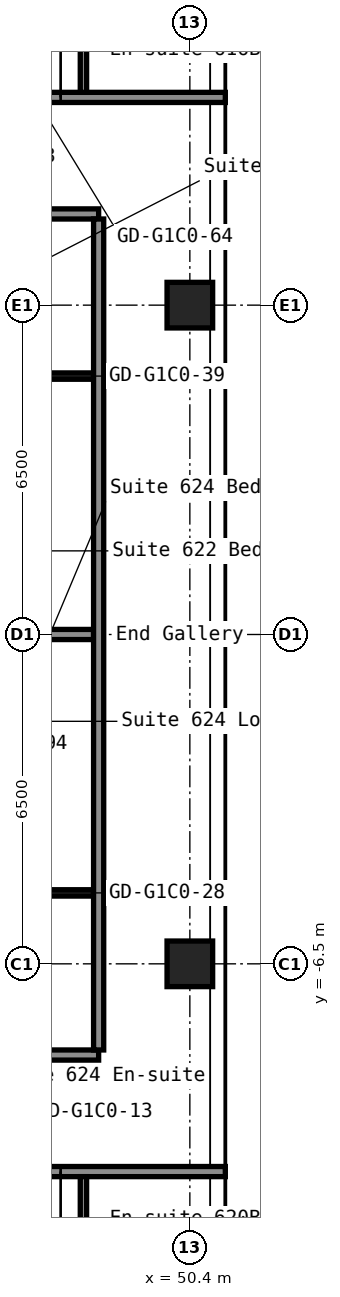
"""IFC4 building model, lengths in metres.
Left out: names, types, materials, properties, quantities, classifications, styles, units other than length and angle.
Written with IfcOpenShell. Run it as: python <this file> out.ifc"""

import sys

from ifc_helpers import new_model, si_unit, direction, frame, frame_2d, origin, origin_2d, place, context, subcontext, project, spatial, rectangle, hollow_rectangle, extrude, element, fill, save


model = new_model("IFC4")
c1 = context("Model", 3, precision=1e-05, world=origin(), true_north=direction((0.0, 1.0)))
c2 = subcontext(c1, "Body", "Model", "MODEL_VIEW")
j1 = project(units=[si_unit("LENGTHUNIT", "METRE"), si_unit("PLANEANGLEUNIT", "RADIAN")], contexts=[c1])
p1 = place(None, origin())
s1 = spatial("IfcSite", under=j1, at=p1, CompositionType="ELEMENT")
p2 = place(p1, origin())
s2 = spatial("IfcBuilding", under=s1, at=p2, CompositionType="ELEMENT")
p3 = place(p2, frame((0.0, 0.0, 26.2)))
s3 = spatial("IfcBuildingStorey", under=s2, at=p3, CompositionType="ELEMENT", Elevation=26.2)
for number, where, z_axis, x_axis in (
    (1, (50.4, -6.5, 0.0), (0.0, 0.0, 1.0), (1.0, 0.0, 0.0)),
    (2, (50.4, 6.5, 0.0), (0.0, 0.0, 1.0), (1.0, 0.0, 0.0)),
):
    element("IfcColumn", number, at=place(p3, frame(where, z_axis=z_axis, x_axis=x_axis)), inside=s3, PredefinedType="COLUMN", context=c2, shape_type="SweptSolid", body=[
        extrude(hollow_rectangle(XDim=0.9, YDim=0.9, WallThickness=0.036, at=origin_2d()), origin(), (0.0, 0.0, 1.0), 2.8),
    ])
p4 = place(p3, frame((16.8, -10.6, 0.0), z_axis=(0.0, 0.0, 1.0), x_axis=(1.0, 0.0, 0.0)))
e3 = element("IfcWall", 3, at=p4, inside=s3, PredefinedType="PARTITIONING", context=c2, shape_type="SweptSolid", body=[
    extrude(rectangle(XDim=34.3, YDim=0.2, at=frame_2d((17.15, 0.0))), origin(), (0.0, 0.0, 1.0), 2.8),
])
p5 = place(p4, frame((2.0, 0.0, 0.0)))
e4 = element("IfcOpeningElement", 4, at=p5, cuts=e3, PredefinedType="OPENING", context=c2, shape_type="SweptSolid", body=[
    extrude(rectangle(XDim=1.0, YDim=2.1, at=frame_2d((0.5, 1.05))), frame((0.0, 0.11, 0.0), z_axis=(0.0, -1.0, 0.0), x_axis=(1.0, 0.0, 0.0)), (0.0, 0.0, 1.0), 0.22),
])
p6 = place(p4, frame((11.25, 0.0, 0.0)))
e5 = element("IfcOpeningElement", 5, at=p6, cuts=e3, PredefinedType="OPENING", context=c2, shape_type="SweptSolid", body=[
    extrude(rectangle(XDim=1.0, YDim=2.1, at=frame_2d((0.5, 1.05))), frame((0.0, 0.11, 0.0), z_axis=(0.0, -1.0, 0.0), x_axis=(1.0, 0.0, 0.0)), (0.0, 0.0, 1.0), 0.22),
])
p7 = place(p4, frame((12.95, 0.0, 0.0)))
e6 = element("IfcOpeningElement", 6, at=p7, cuts=e3, PredefinedType="OPENING", context=c2, shape_type="SweptSolid", body=[
    extrude(rectangle(XDim=1.0, YDim=2.1, at=frame_2d((0.5, 1.05))), frame((0.0, 0.11, 0.0), z_axis=(0.0, -1.0, 0.0), x_axis=(1.0, 0.0, 0.0)), (0.0, 0.0, 1.0), 0.22),
])
p8 = place(p4, frame((18.7, 0.0, 0.0)))
e7 = element("IfcOpeningElement", 7, at=p8, cuts=e3, PredefinedType="OPENING", context=c2, shape_type="SweptSolid", body=[
    extrude(rectangle(XDim=1.0, YDim=2.1, at=frame_2d((0.5, 1.05))), frame((0.0, 0.11, 0.0), z_axis=(0.0, -1.0, 0.0), x_axis=(1.0, 0.0, 0.0)), (0.0, 0.0, 1.0), 0.22),
])
p9 = place(p4, frame((28.15, 0.0, 0.0)))
e8 = element("IfcOpeningElement", 8, at=p9, cuts=e3, PredefinedType="OPENING", context=c2, shape_type="SweptSolid", body=[
    extrude(rectangle(XDim=1.0, YDim=2.1, at=frame_2d((0.5, 1.05))), frame((0.0, 0.11, 0.0), z_axis=(0.0, -1.0, 0.0), x_axis=(1.0, 0.0, 0.0)), (0.0, 0.0, 1.0), 0.22),
])
p10 = place(p4, frame((30.05, 0.0, 0.0)))
e9 = element("IfcOpeningElement", 9, at=p10, cuts=e3, PredefinedType="OPENING", context=c2, shape_type="SweptSolid", body=[
    extrude(rectangle(XDim=1.0, YDim=2.1, at=frame_2d((0.5, 1.05))), frame((0.0, 0.11, 0.0), z_axis=(0.0, -1.0, 0.0), x_axis=(1.0, 0.0, 0.0)), (0.0, 0.0, 1.0), 0.22),
])
p11 = place(p3, frame((33.6, -8.3, 0.0), z_axis=(0.0, 0.0, 1.0), x_axis=(1.0, 0.0, 0.0)))
e10 = element("IfcWall", 10, at=p11, inside=s3, PredefinedType="PARTITIONING", context=c2, shape_type="SweptSolid", body=[
    extrude(rectangle(XDim=15.0, YDim=0.2, at=frame_2d((7.5, 0.0))), origin(), (0.0, 0.0, 1.0), 2.8),
])
p12 = place(p11, frame((2.85, 0.0, 0.0)))
e11 = element("IfcOpeningElement", 11, at=p12, cuts=e10, PredefinedType="OPENING", context=c2, shape_type="SweptSolid", body=[
    extrude(rectangle(XDim=1.0, YDim=2.1, at=frame_2d((0.5, 1.05))), frame((0.0, 0.11, 0.0), z_axis=(0.0, -1.0, 0.0), x_axis=(1.0, 0.0, 0.0)), (0.0, 0.0, 1.0), 0.22),
])
p13 = place(p11, frame((4.55, 0.0, 0.0)))
e12 = element("IfcOpeningElement", 12, at=p13, cuts=e10, PredefinedType="OPENING", context=c2, shape_type="SweptSolid", body=[
    extrude(rectangle(XDim=1.0, YDim=2.1, at=frame_2d((0.5, 1.05))), frame((0.0, 0.11, 0.0), z_axis=(0.0, -1.0, 0.0), x_axis=(1.0, 0.0, 0.0)), (0.0, 0.0, 1.0), 0.22),
])
p14 = place(p11, frame((9.55, 0.0, 0.0)))
e13 = element("IfcOpeningElement", 13, at=p14, cuts=e10, PredefinedType="OPENING", context=c2, shape_type="SweptSolid", body=[
    extrude(rectangle(XDim=1.0, YDim=2.1, at=frame_2d((0.5, 1.05))), frame((0.0, 0.11, 0.0), z_axis=(0.0, -1.0, 0.0), x_axis=(1.0, 0.0, 0.0)), (0.0, 0.0, 1.0), 0.22),
])
p15 = place(p3, frame((45.663, -5.1, 0.0), z_axis=(0.0, 0.0, 1.0), x_axis=(1.0, 0.0, 0.0)))
e14 = element("IfcWall", 14, at=p15, inside=s3, PredefinedType="PARTITIONING", context=c2, shape_type="SweptSolid", body=[
    extrude(rectangle(XDim=2.837, YDim=0.125, at=frame_2d((1.419, 0.0))), origin(), (0.0, 0.0, 1.0), 2.8),
])
p16 = place(p15, frame((1.038, 0.0, 0.0)))
e15 = element("IfcOpeningElement", 15, at=p16, cuts=e14, PredefinedType="OPENING", context=c2, shape_type="SweptSolid", body=[
    extrude(rectangle(XDim=0.8, YDim=2.1, at=frame_2d((0.4, 1.05))), frame((0.0, 0.073, 0.0), z_axis=(0.0, -1.0, 0.0), x_axis=(1.0, 0.0, 0.0)), (0.0, 0.0, 1.0), 0.145),
])
p17 = place(p3, frame((33.6, 0.0, 0.0), z_axis=(0.0, 0.0, 1.0), x_axis=(1.0, 0.0, 0.0)))
e16 = element("IfcWall", 16, at=p17, inside=s3, PredefinedType="PARTITIONING", context=c2, shape_type="SweptSolid", body=[
    extrude(rectangle(XDim=14.9, YDim=0.2, at=frame_2d((7.45, 0.0))), origin(), (0.0, 0.0, 1.0), 2.8),
])
p18 = place(p3, frame((45.663, 5.1, 0.0), z_axis=(0.0, 0.0, 1.0), x_axis=(1.0, 0.0, 0.0)))
e17 = element("IfcWall", 17, at=p18, inside=s3, PredefinedType="PARTITIONING", context=c2, shape_type="SweptSolid", body=[
    extrude(rectangle(XDim=2.837, YDim=0.125, at=frame_2d((1.419, 0.0))), origin(), (0.0, 0.0, 1.0), 2.8),
])
p19 = place(p18, frame((1.038, 0.0, 0.0)))
e18 = element("IfcOpeningElement", 18, at=p19, cuts=e17, PredefinedType="OPENING", context=c2, shape_type="SweptSolid", body=[
    extrude(rectangle(XDim=0.8, YDim=2.1, at=frame_2d((0.4, 1.05))), frame((0.0, 0.073, 0.0), z_axis=(0.0, -1.0, 0.0), x_axis=(1.0, 0.0, 0.0)), (0.0, 0.0, 1.0), 0.145),
])
p20 = place(p3, frame((33.6, 8.3, 0.0), z_axis=(0.0, 0.0, 1.0), x_axis=(1.0, 0.0, 0.0)))
e19 = element("IfcWall", 19, at=p20, inside=s3, PredefinedType="PARTITIONING", context=c2, shape_type="SweptSolid", body=[
    extrude(rectangle(XDim=15.0, YDim=0.2, at=frame_2d((7.5, 0.0))), origin(), (0.0, 0.0, 1.0), 2.8),
])
p21 = place(p20, frame((5.4, 0.0, 0.0)))
e20 = element("IfcOpeningElement", 20, at=p21, cuts=e19, PredefinedType="OPENING", context=c2, shape_type="SweptSolid", body=[
    extrude(rectangle(XDim=1.0, YDim=2.1, at=frame_2d((0.5, 1.05))), frame((0.0, 0.11, 0.0), z_axis=(0.0, -1.0, 0.0), x_axis=(1.0, 0.0, 0.0)), (0.0, 0.0, 1.0), 0.22),
])
p22 = place(p20, frame((9.55, 0.0, 0.0)))
e21 = element("IfcOpeningElement", 21, at=p22, cuts=e19, PredefinedType="OPENING", context=c2, shape_type="SweptSolid", body=[
    extrude(rectangle(XDim=1.0, YDim=2.1, at=frame_2d((0.5, 1.05))), frame((0.0, 0.11, 0.0), z_axis=(0.0, -1.0, 0.0), x_axis=(1.0, 0.0, 0.0)), (0.0, 0.0, 1.0), 0.22),
])
p23 = place(p3, frame((16.8, 10.6, 0.0), z_axis=(0.0, 0.0, 1.0), x_axis=(1.0, 0.0, 0.0)))
e22 = element("IfcWall", 22, at=p23, inside=s3, PredefinedType="PARTITIONING", context=c2, shape_type="SweptSolid", body=[
    extrude(rectangle(XDim=34.3, YDim=0.2, at=frame_2d((17.15, 0.0))), origin(), (0.0, 0.0, 1.0), 2.8),
])
p24 = place(p23, frame((2.0, 0.0, 0.0)))
e23 = element("IfcOpeningElement", 23, at=p24, cuts=e22, PredefinedType="OPENING", context=c2, shape_type="SweptSolid", body=[
    extrude(rectangle(XDim=1.0, YDim=2.1, at=frame_2d((0.5, 1.05))), frame((0.0, 0.11, 0.0), z_axis=(0.0, -1.0, 0.0), x_axis=(1.0, 0.0, 0.0)), (0.0, 0.0, 1.0), 0.22),
])
p25 = place(p23, frame((11.25, 0.0, 0.0)))
e24 = element("IfcOpeningElement", 24, at=p25, cuts=e22, PredefinedType="OPENING", context=c2, shape_type="SweptSolid", body=[
    extrude(rectangle(XDim=1.0, YDim=2.1, at=frame_2d((0.5, 1.05))), frame((0.0, 0.11, 0.0), z_axis=(0.0, -1.0, 0.0), x_axis=(1.0, 0.0, 0.0)), (0.0, 0.0, 1.0), 0.22),
])
p26 = place(p23, frame((12.95, 0.0, 0.0)))
e25 = element("IfcOpeningElement", 25, at=p26, cuts=e22, PredefinedType="OPENING", context=c2, shape_type="SweptSolid", body=[
    extrude(rectangle(XDim=1.0, YDim=2.1, at=frame_2d((0.5, 1.05))), frame((0.0, 0.11, 0.0), z_axis=(0.0, -1.0, 0.0), x_axis=(1.0, 0.0, 0.0)), (0.0, 0.0, 1.0), 0.22),
])
p27 = place(p23, frame((22.2, 0.0, 0.0)))
e26 = element("IfcOpeningElement", 26, at=p27, cuts=e22, PredefinedType="OPENING", context=c2, shape_type="SweptSolid", body=[
    extrude(rectangle(XDim=1.0, YDim=2.1, at=frame_2d((0.5, 1.05))), frame((0.0, 0.11, 0.0), z_axis=(0.0, -1.0, 0.0), x_axis=(1.0, 0.0, 0.0)), (0.0, 0.0, 1.0), 0.22),
])
p28 = place(p23, frame((28.15, 0.0, 0.0)))
e27 = element("IfcOpeningElement", 27, at=p28, cuts=e22, PredefinedType="OPENING", context=c2, shape_type="SweptSolid", body=[
    extrude(rectangle(XDim=1.0, YDim=2.1, at=frame_2d((0.5, 1.05))), frame((0.0, 0.11, 0.0), z_axis=(0.0, -1.0, 0.0), x_axis=(1.0, 0.0, 0.0)), (0.0, 0.0, 1.0), 0.22),
])
p29 = place(p23, frame((30.05, 0.0, 0.0)))
e28 = element("IfcOpeningElement", 28, at=p29, cuts=e22, PredefinedType="OPENING", context=c2, shape_type="SweptSolid", body=[
    extrude(rectangle(XDim=1.0, YDim=2.1, at=frame_2d((0.5, 1.05))), frame((0.0, 0.11, 0.0), z_axis=(0.0, -1.0, 0.0), x_axis=(1.0, 0.0, 0.0)), (0.0, 0.0, 1.0), 0.22),
])
p30 = place(p3, frame((48.3, -13.6, 0.0), z_axis=(0.0, 0.0, 1.0), x_axis=(0.0, 1.0, 0.0)))
e29 = element("IfcWall", 29, at=p30, inside=s3, PredefinedType="PARTITIONING", context=c2, shape_type="SweptSolid", body=[
    extrude(rectangle(XDim=2.9, YDim=0.125, at=frame_2d((1.45, 0.0))), origin(), (0.0, 0.0, 1.0), 2.8),
])
p31 = place(p30, frame((0.6, 0.0, 0.0)))
e30 = element("IfcOpeningElement", 30, at=p31, cuts=e29, PredefinedType="OPENING", context=c2, shape_type="SweptSolid", body=[
    extrude(rectangle(XDim=0.8, YDim=2.1, at=frame_2d((0.4, 1.05))), frame((0.0, 0.073, 0.0), z_axis=(0.0, -1.0, 0.0), x_axis=(1.0, 0.0, 0.0)), (0.0, 0.0, 1.0), 0.145),
])
p32 = place(p3, frame((48.3, 10.7, 0.0), z_axis=(0.0, 0.0, 1.0), x_axis=(0.0, 1.0, 0.0)))
e31 = element("IfcWall", 31, at=p32, inside=s3, PredefinedType="PARTITIONING", context=c2, shape_type="SweptSolid", body=[
    extrude(rectangle(XDim=2.9, YDim=0.125, at=frame_2d((1.45, 0.0))), origin(), (0.0, 0.0, 1.0), 2.8),
])
p33 = place(p32, frame((1.5, 0.0, 0.0)))
e32 = element("IfcOpeningElement", 32, at=p33, cuts=e31, PredefinedType="OPENING", context=c2, shape_type="SweptSolid", body=[
    extrude(rectangle(XDim=0.8, YDim=2.1, at=frame_2d((0.4, 1.05))), frame((0.0, 0.073, 0.0), z_axis=(0.0, -1.0, 0.0), x_axis=(1.0, 0.0, 0.0)), (0.0, 0.0, 1.0), 0.145),
])
p34 = place(p3, frame((48.6, -8.2, 0.0), z_axis=(0.0, 0.0, 1.0), x_axis=(0.0, 1.0, 0.0)))
e33 = element("IfcWall", 33, at=p34, inside=s3, PredefinedType="PARTITIONING", context=c2, shape_type="SweptSolid", body=[
    extrude(rectangle(XDim=16.4, YDim=0.2, at=frame_2d((8.2, 0.0))), origin(), (0.0, 0.0, 1.0), 2.8),
])
p35 = place(p10, origin())
e34 = element("IfcDoor", 34, at=p35, inside=s3, OperationType="SINGLE_SWING_RIGHT", PredefinedType="DOOR", context=c2, shape_type="SweptSolid", body=[
    extrude(rectangle(XDim=1.0, YDim=2.1, at=frame_2d((0.5, 1.05))), frame((0.0, 0.025, 0.0), z_axis=(0.0, -1.0, 0.0), x_axis=(1.0, 0.0, 0.0)), (0.0, 0.0, 1.0), 0.05),
])
fill(e9, e34)
p36 = place(p29, origin())
e35 = element("IfcDoor", 35, at=p36, inside=s3, OperationType="SINGLE_SWING_LEFT", PredefinedType="DOOR", context=c2, shape_type="SweptSolid", body=[
    extrude(rectangle(XDim=1.0, YDim=2.1, at=frame_2d((0.5, 1.05))), frame((0.0, 0.025, 0.0), z_axis=(0.0, -1.0, 0.0), x_axis=(1.0, 0.0, 0.0)), (0.0, 0.0, 1.0), 0.05),
])
fill(e28, e35)
save(model, sys.argv[1])
